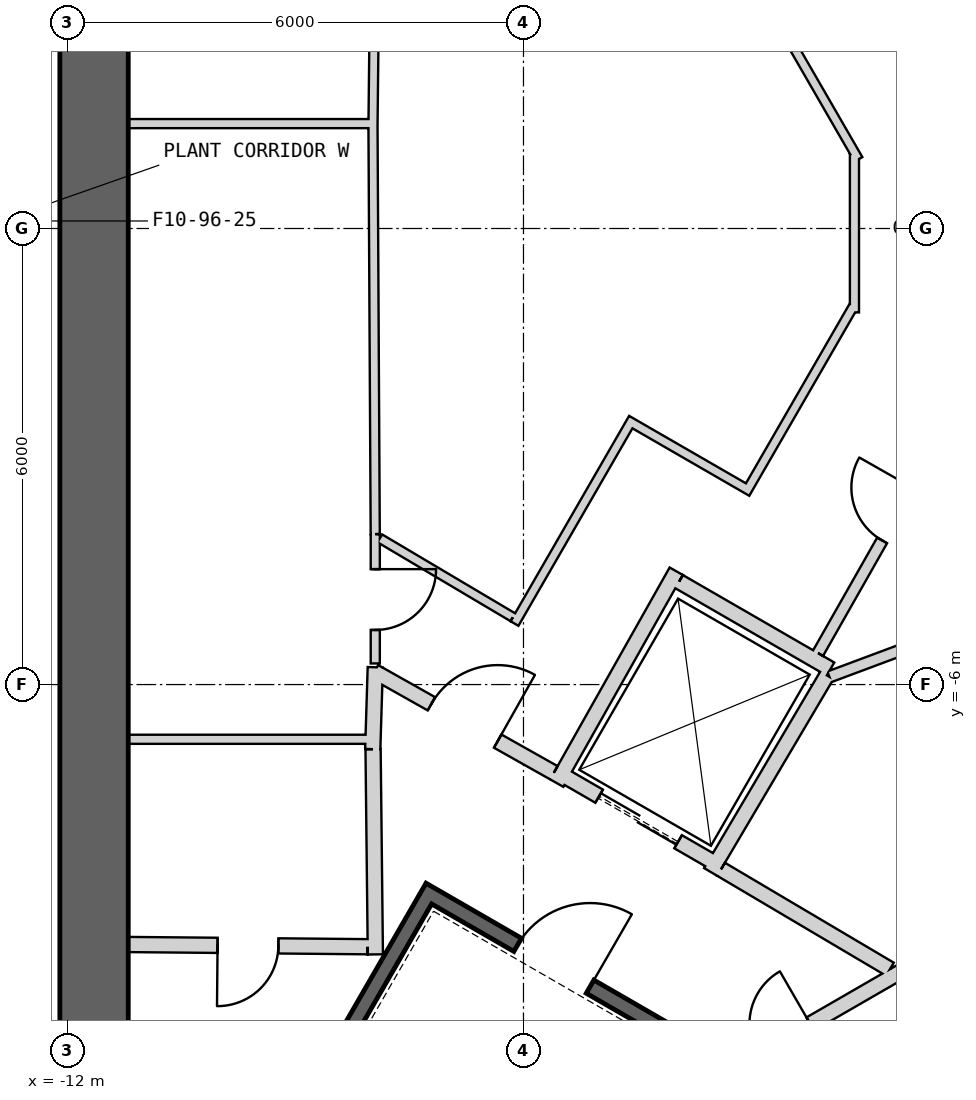
"""IFC4 building model, lengths in metres.
Left out: names, types, materials, properties, quantities, classifications, styles, units other than length and angle.
Written with IfcOpenShell. Run it as: python <this file> out.ifc"""

import sys

from ifc_helpers import new_model, si_unit, direction, frame, frame_2d, origin, place, context, subcontext, project, spatial, rectangle, extrude, element, fill, save


model = new_model("IFC4")
c1 = context("Model", 3, precision=1e-05, world=origin(), true_north=direction((0.0, 1.0)))
c2 = subcontext(c1, "Body", "Model", "MODEL_VIEW")
j1 = project(units=[si_unit("LENGTHUNIT", "METRE"), si_unit("PLANEANGLEUNIT", "RADIAN")], contexts=[c1])
p1 = place(None, origin())
s1 = spatial("IfcSite", under=j1, at=p1, CompositionType="ELEMENT")
p2 = place(p1, origin())
s2 = spatial("IfcBuilding", under=s1, at=p2, CompositionType="ELEMENT")
p3 = place(p2, frame((0.0, 0.0, 425.3)))
s3 = spatial("IfcBuildingStorey", under=s2, at=p3, CompositionType="ELEMENT", Elevation=425.3)
p4 = place(p3, frame((19.475, 2.208, 0.0), z_axis=(0.0, 0.0, 1.0), x_axis=(-0.866028369851, 0.499994862586, 0.0)))
e1 = element("IfcWall", 1, at=p4, inside=s3, PredefinedType="SHEAR", context=c2, shape_type="SweptSolid", body=[
    extrude(rectangle(XDim=31.523, YDim=0.9, at=frame_2d((15.762, 0.0))), origin(), (0.0, 0.0, 1.0), 5.0),
])
p5 = place(p4, frame((3.612, 0.0, 0.0)))
e2 = element("IfcOpeningElement", 2, at=p5, cuts=e1, PredefinedType="OPENING", context=c2, shape_type="SweptSolid", body=[
    extrude(rectangle(XDim=1.2, YDim=2.4, at=frame_2d((0.6, 1.2))), frame((0.0, 0.46, 0.0), z_axis=(0.0, -1.0, 0.0), x_axis=(1.0, 0.0, 0.0)), (0.0, 0.0, 1.0), 0.92),
])
p6 = place(p4, frame((26.712, 0.0, 0.0)))
e3 = element("IfcOpeningElement", 3, at=p6, cuts=e1, PredefinedType="OPENING", context=c2, shape_type="SweptSolid", body=[
    extrude(rectangle(XDim=1.2, YDim=2.4, at=frame_2d((0.6, 1.2))), frame((0.0, 0.46, 0.0), z_axis=(0.0, -1.0, 0.0), x_axis=(1.0, 0.0, 0.0)), (0.0, 0.0, 1.0), 0.92),
])
p7 = place(p3, frame((-11.65, 15.762, 0.0), z_axis=(0.0, 0.0, 1.0), x_axis=(0.0, -1.0, 0.0)))
e4 = element("IfcWall", 4, at=p7, inside=s3, PredefinedType="SHEAR", context=c2, shape_type="SweptSolid", body=[
    extrude(rectangle(XDim=31.523, YDim=0.9, at=frame_2d((15.762, 0.0))), origin(), (0.0, 0.0, 1.0), 5.0),
])
p8 = place(p7, frame((3.612, 0.0, 0.0)))
e5 = element("IfcOpeningElement", 5, at=p8, cuts=e4, PredefinedType="OPENING", context=c2, shape_type="SweptSolid", body=[
    extrude(rectangle(XDim=1.2, YDim=2.4, at=frame_2d((0.6, 1.2))), frame((0.0, 0.46, 0.0), z_axis=(0.0, -1.0, 0.0), x_axis=(1.0, 0.0, 0.0)), (0.0, 0.0, 1.0), 0.92),
])
p9 = place(p7, frame((26.712, 0.0, 0.0)))
e6 = element("IfcOpeningElement", 6, at=p9, cuts=e4, PredefinedType="OPENING", context=c2, shape_type="SweptSolid", body=[
    extrude(rectangle(XDim=1.2, YDim=2.4, at=frame_2d((0.6, 1.2))), frame((0.0, 0.46, 0.0), z_axis=(0.0, -1.0, 0.0), x_axis=(1.0, 0.0, 0.0)), (0.0, 0.0, 1.0), 0.92),
])
p10 = place(p3, frame((-7.825, -17.97, 0.0), z_axis=(0.0, 0.0, 1.0), x_axis=(0.866028369851, 0.499994862586, 0.0)))
e7 = element("IfcWall", 7, at=p10, inside=s3, PredefinedType="SHEAR", context=c2, shape_type="SweptSolid", body=[
    extrude(rectangle(XDim=31.523, YDim=0.9, at=frame_2d((15.762, 0.0))), origin(), (0.0, 0.0, 1.0), 5.0),
])
p11 = place(p10, frame((17.862, 0.0, 0.0)))
e8 = element("IfcOpeningElement", 8, at=p11, cuts=e7, PredefinedType="OPENING", context=c2, shape_type="SweptSolid", body=[
    extrude(rectangle(XDim=1.2, YDim=2.4, at=frame_2d((0.6, 1.2))), frame((0.0, 0.46, 0.0), z_axis=(0.0, -1.0, 0.0), x_axis=(1.0, 0.0, 0.0)), (0.0, 0.0, 1.0), 0.92),
])
p12 = place(p10, frame((20.562, 0.0, 0.0)))
e9 = element("IfcOpeningElement", 9, at=p12, cuts=e7, PredefinedType="OPENING", context=c2, shape_type="SweptSolid", body=[
    extrude(rectangle(XDim=1.2, YDim=2.4, at=frame_2d((0.6, 1.2))), frame((0.0, 0.46, 0.0), z_axis=(0.0, -1.0, 0.0), x_axis=(1.0, 0.0, 0.0)), (0.0, 0.0, 1.0), 0.92),
])
p13 = place(p10, frame((26.712, 0.0, 0.0)))
e10 = element("IfcOpeningElement", 10, at=p13, cuts=e7, PredefinedType="OPENING", context=c2, shape_type="SweptSolid", body=[
    extrude(rectangle(XDim=1.2, YDim=2.4, at=frame_2d((0.6, 1.2))), frame((0.0, 0.46, 0.0), z_axis=(0.0, -1.0, 0.0), x_axis=(1.0, 0.0, 0.0)), (0.0, 0.0, 1.0), 0.92),
])
p14 = place(p10, frame((3.612, 0.0, 0.0)))
e11 = element("IfcOpeningElement", 11, at=p14, cuts=e7, PredefinedType="OPENING", context=c2, shape_type="SweptSolid", body=[
    extrude(rectangle(XDim=1.2, YDim=2.4, at=frame_2d((0.6, 1.2))), frame((0.0, 0.46, 0.0), z_axis=(0.0, -1.0, 0.0), x_axis=(1.0, 0.0, 0.0)), (0.0, 0.0, 1.0), 0.92),
])
p15 = place(p3, frame((16.933, -7.402, 0.04), z_axis=(0.0, 0.0, 1.0), x_axis=(-0.824479303652, -0.565892107958, 0.0)))
e12 = element("IfcWall", 12, at=p15, inside=s3, PredefinedType="PARAPET", context=c2, shape_type="SweptSolid", body=[
    extrude(rectangle(XDim=21.975, YDim=0.25, at=frame_2d((10.987, 0.0))), origin(), (0.0, 0.0, 1.0), 1.2),
])
p16 = place(p3, frame((16.181, -7.25, 0.04), z_axis=(0.0, 0.0, 1.0), x_axis=(-0.824481781464, -0.56588849788, 0.0)))
e13 = element("IfcWall", 13, at=p16, inside=s3, PredefinedType="PARAPET", context=c2, shape_type="SweptSolid", body=[
    extrude(rectangle(XDim=20.799, YDim=0.5, at=frame_2d((10.399, 0.0))), origin(), (0.0, 0.0, 1.0), 0.6),
])
p17 = place(p3, frame((-7.196, -8.663, -0.25), z_axis=(0.0, 0.0, 1.0), x_axis=(-0.499997992926, -0.866026562566, 0.0)))
e14 = element("IfcWall", 14, at=p17, inside=s3, PredefinedType="SHEAR", context=c2, shape_type="SweptSolid", body=[
    extrude(rectangle(XDim=7.9, YDim=0.2, at=frame_2d((3.95, 0.0))), origin(), (0.0, 0.0, 1.0), 5.0),
])
p18 = place(p3, frame((-4.041, -10.599, -0.25), z_axis=(0.0, 0.0, 1.0), x_axis=(-0.866047807691, 0.499961193289, 0.0)))
e15 = element("IfcWall", 15, at=p18, inside=s3, PredefinedType="SHEAR", context=c2, shape_type="SweptSolid", body=[
    extrude(rectangle(XDim=3.6, YDim=0.2, at=frame_2d((1.8, 0.0))), origin(), (0.0, 0.0, 1.0), 5.0),
])
p19 = place(p18, frame((1.25, 0.0, 0.25)))
e16 = element("IfcOpeningElement", 16, at=p19, cuts=e15, PredefinedType="OPENING", context=c2, shape_type="SweptSolid", body=[
    extrude(rectangle(XDim=1.1, YDim=2.1, at=frame_2d((0.55, 1.05))), frame((0.0, 0.11, 0.0), z_axis=(0.0, -1.0, 0.0), x_axis=(1.0, 0.0, 0.0)), (0.0, 0.0, 1.0), 0.22),
])
p20 = place(p3, frame((-3.446, -8.368, 0.0), z_axis=(0.0, 0.0, 1.0), x_axis=(-0.866024647952, 0.500001309137, 0.0)))
e17 = element("IfcWall", 17, at=p20, inside=s3, PredefinedType="PLUMBINGWALL", context=c2, shape_type="SweptSolid", body=[
    extrude(rectangle(XDim=2.4, YDim=0.2, at=frame_2d((1.2, 0.0))), origin(), (0.0, 0.0, 1.0), 4.75),
])
p21 = place(p20, frame((0.6, 0.0, 0.0)))
e18 = element("IfcOpeningElement", 18, at=p21, cuts=e17, PredefinedType="OPENING", context=c2, shape_type="SweptSolid", body=[
    extrude(rectangle(XDim=1.2, YDim=2.4, at=frame_2d((0.6, 1.2))), frame((0.0, 0.11, 0.0), z_axis=(0.0, -1.0, 0.0), x_axis=(1.0, 0.0, 0.0)), (0.0, 0.0, 1.0), 0.22),
])
p22 = place(p3, frame((-3.953, -4.646, 0.0), z_axis=(0.0, 0.0, 1.0), x_axis=(0.866053019151, -0.499952165731, 0.0)))
e19 = element("IfcWall", 19, at=p22, inside=s3, PredefinedType="PLUMBINGWALL", context=c2, shape_type="SweptSolid", body=[
    extrude(rectangle(XDim=2.3, YDim=0.2, at=frame_2d((1.15, 0.0))), origin(), (0.0, 0.0, 1.0), 4.75),
])
p23 = place(p3, frame((-2.008, -5.878, 0.0), z_axis=(0.0, 0.0, 1.0), x_axis=(-0.508893526607, -0.860829471253, 0.0)))
e20 = element("IfcWall", 20, at=p23, inside=s3, PredefinedType="PLUMBINGWALL", context=c2, shape_type="SweptSolid", body=[
    extrude(rectangle(XDim=3.005, YDim=0.2, at=frame_2d((1.502, 0.0))), origin(), (0.0, 0.0, 1.0), 4.75),
])
p24 = place(p3, frame((-3.99, -4.509, 0.0), z_axis=(0.0, 0.0, 1.0), x_axis=(-0.491358283181, -0.870957540612, 0.0)))
e21 = element("IfcWall", 21, at=p24, inside=s3, PredefinedType="PLUMBINGWALL", context=c2, shape_type="SweptSolid", body=[
    extrude(rectangle(XDim=3.2, YDim=0.2, at=frame_2d((1.6, 0.0))), origin(), (0.0, 0.0, 1.0), 4.75),
])
p25 = place(p3, frame((-7.95, 1.38, 0.0), z_axis=(0.0, 0.0, 1.0), x_axis=(-1.0, 0.0, 0.0)))
e22 = element("IfcWall", 22, at=p25, inside=s3, PredefinedType="PARTITIONING", context=c2, shape_type="SweptSolid", body=[
    extrude(rectangle(XDim=3.25, YDim=0.12, at=frame_2d((1.625, 0.0))), origin(), (0.0, 0.0, 1.0), 4.75),
])
p26 = place(p3, frame((-7.951, 4.02, 0.0), z_axis=(0.0, 0.0, 1.0), x_axis=(-0.010879853406, -0.999940812643, 0.0)))
e23 = element("IfcWall", 23, at=p26, inside=s3, PredefinedType="PARTITIONING", context=c2, shape_type="SweptSolid", body=[
    extrude(rectangle(XDim=2.67, YDim=0.12, at=frame_2d((1.335, 0.0))), origin(), (0.0, 0.0, 1.0), 4.75),
])
p27 = place(p3, frame((-7.95, -5.722, 0.0), z_axis=(0.0, 0.0, 1.0), x_axis=(0.0, 1.0, 0.0)))
e24 = element("IfcWall", 24, at=p27, inside=s3, PredefinedType="PARTITIONING", context=c2, shape_type="SweptSolid", body=[
    extrude(rectangle(XDim=1.702, YDim=0.12, at=frame_2d((0.851, 0.0))), origin(), (0.0, 0.0, 1.0), 4.75),
])
p28 = place(p27, frame((0.441, 0.0, 0.0)))
e25 = element("IfcOpeningElement", 25, at=p28, cuts=e24, PredefinedType="OPENING", context=c2, shape_type="SweptSolid", body=[
    extrude(rectangle(XDim=0.8, YDim=2.1, at=frame_2d((0.4, 1.05))), frame((0.0, 0.07, 0.0), z_axis=(0.0, -1.0, 0.0), x_axis=(1.0, 0.0, 0.0)), (0.0, 0.0, 1.0), 0.14),
])
p29 = place(p3, frame((-11.2, -6.72, 0.0), z_axis=(0.0, 0.0, 1.0), x_axis=(1.0, 0.0, 0.0)))
e26 = element("IfcWall", 26, at=p29, inside=s3, PredefinedType="PARTITIONING", context=c2, shape_type="SweptSolid", body=[
    extrude(rectangle(XDim=3.25, YDim=0.12, at=frame_2d((1.625, 0.0))), origin(), (0.0, 0.0, 1.0), 4.75),
])
p30 = place(p3, frame((-7.983, -6.85, 0.0), z_axis=(0.0, 0.0, 1.0), x_axis=(0.030803413295, 0.999525462272, 0.0)))
e27 = element("IfcWall", 27, at=p30, inside=s3, PredefinedType="PARTITIONING", context=c2, shape_type="SweptSolid", body=[
    extrude(rectangle(XDim=1.078, YDim=0.2, at=frame_2d((0.539, 0.0))), origin(), (0.0, 0.0, 1.0), 4.75),
])
p31 = place(p3, frame((-7.98, 1.35, 0.0), z_axis=(0.0, 0.0, 1.0), x_axis=(0.005500666883, -0.999984871217, 0.0)))
e28 = element("IfcWall", 28, at=p31, inside=s3, PredefinedType="PARTITIONING", context=c2, shape_type="SweptSolid", body=[
    extrude(rectangle(XDim=5.37, YDim=0.12, at=frame_2d((2.685, 0.0))), origin(), (0.0, 0.0, 1.0), 4.75),
])
p32 = place(p3, frame((-7.949, -9.55, 0.0), z_axis=(0.0, 0.0, 1.0), x_axis=(-0.011121475088, 0.999938154483, 0.0)))
e29 = element("IfcWall", 29, at=p32, inside=s3, PredefinedType="PARTITIONING", context=c2, shape_type="SweptSolid", body=[
    extrude(rectangle(XDim=2.7, YDim=0.2, at=frame_2d((1.35, 0.0))), origin(), (0.0, 0.0, 1.0), 4.75),
])
p33 = place(p3, frame((-11.2, -9.42, 0.0), z_axis=(0.0, 0.0, 1.0), x_axis=(0.999957467379, -0.009222983926, 0.0)))
e30 = element("IfcWall", 30, at=p33, inside=s3, PredefinedType="PARTITIONING", context=c2, shape_type="SweptSolid", body=[
    extrude(rectangle(XDim=3.15, YDim=0.2, at=frame_2d((1.575, 0.0))), origin(), (0.0, 0.0, 1.0), 4.75),
])
p34 = place(p33, frame((1.175, 0.0, 0.0)))
e31 = element("IfcOpeningElement", 31, at=p34, cuts=e30, PredefinedType="OPENING", context=c2, shape_type="SweptSolid", body=[
    extrude(rectangle(XDim=0.8, YDim=2.1, at=frame_2d((0.4, 1.05))), frame((0.0, 0.11, 0.0), z_axis=(0.0, -1.0, 0.0), x_axis=(1.0, 0.0, 0.0)), (0.0, 0.0, 1.0), 0.22),
])
p35 = place(p3, frame((-1.024, -9.771, 0.0), z_axis=(0.0, 0.0, 1.0), x_axis=(-0.866029903013, -0.499992207027, 0.0)))
e32 = element("IfcWall", 32, at=p35, inside=s3, PredefinedType="PARTITIONING", context=c2, shape_type="SweptSolid", body=[
    extrude(rectangle(XDim=3.578, YDim=0.2, at=frame_2d((1.789, 0.0))), origin(), (0.0, 0.0, 1.0), 4.75),
])
p36 = place(p35, frame((1.389, 0.0, 0.0)))
e33 = element("IfcOpeningElement", 33, at=p36, cuts=e32, PredefinedType="OPENING", context=c2, shape_type="SweptSolid", body=[
    extrude(rectangle(XDim=0.8, YDim=2.1, at=frame_2d((0.4, 1.05))), frame((0.0, 0.11, 0.0), z_axis=(0.0, -1.0, 0.0), x_axis=(1.0, 0.0, 0.0)), (0.0, 0.0, 1.0), 0.22),
])
p37 = place(p3, frame((-3.401, -8.43, 0.0), z_axis=(0.0, 0.0, 1.0), x_axis=(0.860630814782, -0.509229418482, 0.0)))
e34 = element("IfcWall", 34, at=p37, inside=s3, PredefinedType="PARTITIONING", context=c2, shape_type="SweptSolid", body=[
    extrude(rectangle(XDim=2.582, YDim=0.2, at=frame_2d((1.291, 0.0))), origin(), (0.0, 0.0, 1.0), 4.75),
])
p38 = place(p3, frame((-7.961, -5.831, 0.0), z_axis=(0.0, 0.0, 1.0), x_axis=(0.871337173459, -0.490684756385, 0.0)))
e35 = element("IfcWall", 35, at=p38, inside=s3, PredefinedType="PARTITIONING", context=c2, shape_type="SweptSolid", body=[
    extrude(rectangle(XDim=2.709, YDim=0.2, at=frame_2d((1.354, 0.0))), origin(), (0.0, 0.0, 1.0), 4.75),
])
p39 = place(p38, frame((0.861, 0.0, 0.0)))
e36 = element("IfcOpeningElement", 36, at=p39, cuts=e35, PredefinedType="OPENING", context=c2, shape_type="SweptSolid", body=[
    extrude(rectangle(XDim=1.0, YDim=2.1, at=frame_2d((0.5, 1.05))), frame((0.0, 0.11, 0.0), z_axis=(0.0, -1.0, 0.0), x_axis=(1.0, 0.0, 0.0)), (0.0, 0.0, 1.0), 0.22),
])
p40 = place(p3, frame((-2.124, 5.586, 0.0), z_axis=(0.0, 0.0, 1.0), x_axis=(0.494084527552, -0.869413871314, 0.0)))
e37 = element("IfcWall", 37, at=p40, inside=s3, PredefinedType="PLUMBINGWALL", context=c2, shape_type="SweptSolid", body=[
    extrude(rectangle(XDim=4.188, YDim=0.15, at=frame_2d((2.094, 0.0))), origin(), (0.0, 0.0, 1.0), 4.75),
])
p41 = place(p3, frame((6.729, -2.65, 0.0), z_axis=(0.0, 0.0, 1.0), x_axis=(-0.936914282609, -0.349559189613, 0.0)))
e38 = element("IfcWall", 38, at=p41, inside=s3, PredefinedType="PLUMBINGWALL", context=c2, shape_type="SweptSolid", body=[
    extrude(rectangle(XDim=9.291, YDim=0.15, at=frame_2d((4.645, 0.0))), origin(), (0.0, 0.0, 1.0), 4.75),
])
p42 = place(p3, frame((0.02, -1.814, 0.0), z_axis=(0.0, 0.0, 1.0), x_axis=(-0.494047106341, -0.869435136578, 0.0)))
e39 = element("IfcWall", 39, at=p42, inside=s3, PredefinedType="PLUMBINGWALL", context=c2, shape_type="SweptSolid", body=[
    extrude(rectangle(XDim=4.339, YDim=0.15, at=frame_2d((2.17, 0.0))), origin(), (0.0, 0.0, 1.0), 4.75),
])
p43 = place(p42, frame((1.833, 0.0, 0.0)))
e40 = element("IfcOpeningElement", 40, at=p43, cuts=e39, PredefinedType="OPENING", context=c2, shape_type="SweptSolid", body=[
    extrude(rectangle(XDim=0.8, YDim=2.1, at=frame_2d((0.4, 1.05))), frame((0.0, 0.085, 0.0), z_axis=(0.0, -1.0, 0.0), x_axis=(1.0, 0.0, 0.0)), (0.0, 0.0, 1.0), 0.17),
])
p44 = place(p3, frame((-1.594, 0.91, 0.0), z_axis=(0.0, 0.0, 1.0), x_axis=(-0.49997412077, 0.866040344649, 0.0)))
e41 = element("IfcWall", 41, at=p44, inside=s3, PredefinedType="PARTITIONING", context=c2, shape_type="SweptSolid", body=[
    extrude(rectangle(XDim=2.855, YDim=0.12, at=frame_2d((1.428, 0.0))), origin(), (0.0, 0.0, 1.0), 4.75),
])
p45 = place(p3, frame((-1.646, -1.104, 0.0), z_axis=(0.0, 0.0, 1.0), x_axis=(0.0, 1.0, 0.0)))
e42 = element("IfcWall", 42, at=p45, inside=s3, PredefinedType="PARTITIONING", context=c2, shape_type="SweptSolid", body=[
    extrude(rectangle(XDim=2.085, YDim=0.12, at=frame_2d((1.043, 0.0))), origin(), (0.0, 0.0, 1.0), 4.75),
])
p46 = place(p3, frame((-3.081, -3.487, 0.0), z_axis=(0.0, 0.0, 1.0), x_axis=(0.499986688891, 0.86603308882, 0.0)))
e43 = element("IfcWall", 43, at=p46, inside=s3, PredefinedType="PARTITIONING", context=c2, shape_type="SweptSolid", body=[
    extrude(rectangle(XDim=2.853, YDim=0.12, at=frame_2d((1.426, 0.0))), origin(), (0.0, 0.0, 1.0), 4.75),
])
p47 = place(p3, frame((-4.64, -2.517, 0.0), z_axis=(0.0, 0.0, 1.0), x_axis=(0.866025242659, -0.500000279077, 0.0)))
e44 = element("IfcWall", 44, at=p47, inside=s3, PredefinedType="PARTITIONING", context=c2, shape_type="SweptSolid", body=[
    extrude(rectangle(XDim=1.775, YDim=0.12, at=frame_2d((0.887, 0.0))), origin(), (0.0, 0.0, 1.0), 4.75),
])
p48 = place(p3, frame((-6.118, -5.197, 0.0), z_axis=(0.0, 0.0, 1.0), x_axis=(0.499990139034, 0.866031096941, 0.0)))
e45 = element("IfcWall", 45, at=p48, inside=s3, PredefinedType="PARTITIONING", context=c2, shape_type="SweptSolid", body=[
    extrude(rectangle(XDim=3.0, YDim=0.12, at=frame_2d((1.5, 0.0))), origin(), (0.0, 0.0, 1.0), 4.75),
])
p49 = place(p3, frame((-7.89, -4.077, 0.0), z_axis=(0.0, 0.0, 1.0), x_axis=(0.860118010064, -0.510095097765, 0.0)))
e46 = element("IfcWall", 46, at=p49, inside=s3, PredefinedType="PARTITIONING", context=c2, shape_type="SweptSolid", body=[
    extrude(rectangle(XDim=2.035, YDim=0.12, at=frame_2d((1.017, 0.0))), origin(), (0.0, 0.0, 1.0), 4.75),
])
p50 = place(p19, origin())
e47 = element("IfcDoor", 47, at=p50, inside=s3, OperationType="SINGLE_SWING_LEFT", PredefinedType="USERDEFINED", context=c2, shape_type="SweptSolid", body=[
    extrude(rectangle(XDim=1.1, YDim=2.1, at=frame_2d((0.55, 1.05))), frame((0.0, 0.025, 0.0), z_axis=(0.0, -1.0, 0.0), x_axis=(1.0, 0.0, 0.0)), (0.0, 0.0, 1.0), 0.05),
])
fill(e16, e47)
p51 = place(p39, origin())
e48 = element("IfcDoor", 48, at=p51, inside=s3, OperationType="SINGLE_SWING_RIGHT", PredefinedType="USERDEFINED", context=c2, shape_type="SweptSolid", body=[
    extrude(rectangle(XDim=1.0, YDim=2.1, at=frame_2d((0.5, 1.05))), frame((0.0, 0.025, 0.0), z_axis=(0.0, -1.0, 0.0), x_axis=(1.0, 0.0, 0.0)), (0.0, 0.0, 1.0), 0.05),
])
fill(e36, e48)
p52 = place(p21, origin())
e49 = element("IfcDoor", 49, at=p52, inside=s3, OperationType="SLIDING_TO_LEFT", PredefinedType="USERDEFINED", context=c2, shape_type="SweptSolid", body=[
    extrude(rectangle(XDim=1.2, YDim=2.4, at=frame_2d((0.6, 1.2))), frame((0.0, 0.025, 0.0), z_axis=(0.0, -1.0, 0.0), x_axis=(1.0, 0.0, 0.0)), (0.0, 0.0, 1.0), 0.05),
])
fill(e18, e49)
p53 = place(p43, origin())
e50 = element("IfcDoor", 50, at=p53, inside=s3, OperationType="SINGLE_SWING_LEFT", PredefinedType="USERDEFINED", context=c2, shape_type="SweptSolid", body=[
    extrude(rectangle(XDim=0.8, YDim=2.1, at=frame_2d((0.4, 1.05))), frame((0.0, 0.025, 0.0), z_axis=(0.0, -1.0, 0.0), x_axis=(1.0, 0.0, 0.0)), (0.0, 0.0, 1.0), 0.05),
])
fill(e40, e50)
p54 = place(p28, origin())
e51 = element("IfcDoor", 51, at=p54, inside=s3, OperationType="SINGLE_SWING_RIGHT", PredefinedType="USERDEFINED", context=c2, shape_type="SweptSolid", body=[
    extrude(rectangle(XDim=0.8, YDim=2.1, at=frame_2d((0.4, 1.05))), frame((0.0, 0.025, 0.0), z_axis=(0.0, -1.0, 0.0), x_axis=(1.0, 0.0, 0.0)), (0.0, 0.0, 1.0), 0.05),
])
fill(e25, e51)
p55 = place(p34, origin())
e52 = element("IfcDoor", 52, at=p55, inside=s3, OperationType="SINGLE_SWING_LEFT", PredefinedType="USERDEFINED", context=c2, shape_type="SweptSolid", body=[
    extrude(rectangle(XDim=0.8, YDim=2.1, at=frame_2d((0.4, 1.05))), frame((0.0, 0.025, 0.0), z_axis=(0.0, -1.0, 0.0), x_axis=(1.0, 0.0, 0.0)), (0.0, 0.0, 1.0), 0.05),
])
fill(e31, e52)
save(model, sys.argv[1])
